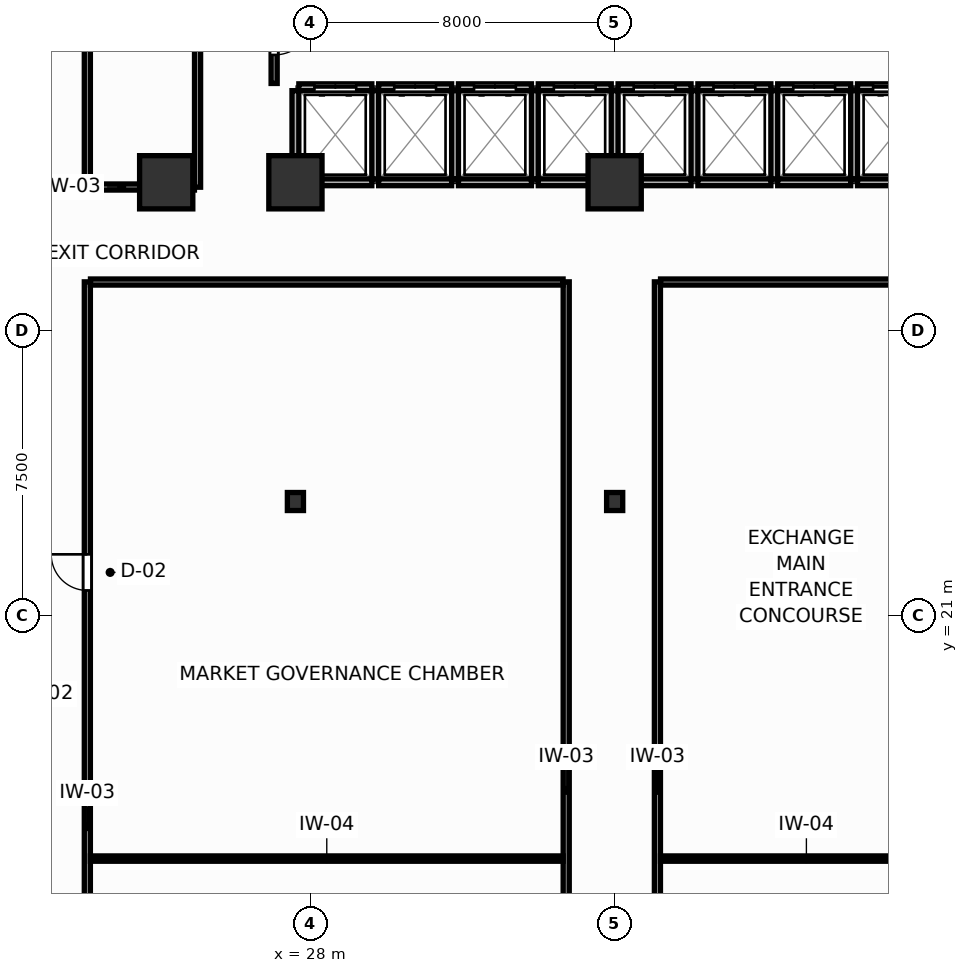
"""IFC4 building model, lengths in metres.
Left out: names, types, materials, properties, quantities, classifications, styles, units other than length and angle.
Written with IfcOpenShell. Run it as: python <this file> out.ifc"""

import sys

from ifc_helpers import new_model, si_unit, direction, frame, frame_2d, origin, origin_2d, place, context, subcontext, project, spatial, rectangle, i_section, extrude, source, transform, mapped, element, fill, save


model = new_model("IFC4")
c1 = context("Model", 3, precision=1e-05, world=origin(), true_north=direction((0.0, 1.0)))
c2 = subcontext(c1, "Body", "Model", "MODEL_VIEW")
j1 = project(units=[si_unit("LENGTHUNIT", "METRE"), si_unit("PLANEANGLEUNIT", "RADIAN")], contexts=[c1])
p1 = place(None, origin())
s1 = spatial("IfcSite", under=j1, at=p1, CompositionType="ELEMENT")
p2 = place(p1, origin())
s2 = spatial("IfcBuilding", under=s1, at=p2, CompositionType="ELEMENT")
p3 = place(p2, origin())
s3 = spatial("IfcBuildingStorey", under=s2, at=p3, CompositionType="ELEMENT", Elevation=0.0)
m1 = source(origin(), c2, "Body", "SweptSolid", [
    extrude(rectangle(XDim=1.4, YDim=1.4, at=origin_2d()), origin(), (0.0, 0.0, 1.0), 4.8),
])
for number, where, z_axis, x_axis in (
    (1, (27.6, 32.4, 0.0), (0.0, 0.0, 1.0), (1.0, 0.0, 0.0)),
    (2, (36.0, 32.4, 0.0), (0.0, 0.0, 1.0), (1.0, 0.0, 0.0)),
    (3, (24.2, 32.4, 0.0), (0.0, 0.0, 1.0), (1.0, 0.0, 0.0)),
):
    element("IfcColumn", number, at=place(p3, frame(where, z_axis=z_axis, x_axis=x_axis)), inside=s3, PredefinedType="COLUMN", context=c2, shape_type="MappedRepresentation", body=[
        mapped(m1, transform((0.0, 0.0, 0.0), scale=1.0)),
    ])
m2 = source(origin(), c2, "Body", "SweptSolid", [
    extrude(i_section(OverallWidth=0.424, OverallDepth=0.474, WebThickness=0.045, FlangeThickness=0.072, FilletRadius=0.015, at=origin_2d()), origin(), (0.0, 0.0, 1.0), 4.8),
])
for number, where, z_axis, x_axis in (
    (4, (27.6, 24.0, 0.0), (0.0, 0.0, 1.0), (1.0, 0.0, 0.0)),
    (5, (36.0, 24.0, 0.0), (0.0, 0.0, 1.0), (1.0, 0.0, 0.0)),
):
    element("IfcColumn", number, at=place(p3, frame(where, z_axis=z_axis, x_axis=x_axis)), inside=s3, PredefinedType="COLUMN", context=c2, shape_type="MappedRepresentation", body=[
        mapped(m2, transform((0.0, 0.0, 0.0), scale=1.0)),
    ])
p4 = place(p3, frame((27.69, 34.9, 0.0), z_axis=(0.0, 0.0, 1.0), x_axis=(1.0, 0.0, 0.0)))
e6 = element("IfcWall", 6, at=p4, inside=s3, PredefinedType="PARTITIONING", context=c2, shape_type="SweptSolid", body=[
    extrude(rectangle(XDim=1.92, YDim=0.18, at=frame_2d((0.96, 0.0))), origin(), (0.0, 0.0, 1.0), 4.52),
])
p5 = place(p4, frame((0.41, 0.0, 0.0)))
e7 = element("IfcOpeningElement", 7, at=p5, cuts=e6, PredefinedType="OPENING", context=c2, shape_type="SweptSolid", body=[
    extrude(rectangle(XDim=1.1, YDim=2.1, at=frame_2d((0.55, 1.05))), frame((0.0, 0.1, 0.0), z_axis=(0.0, -1.0, 0.0), x_axis=(1.0, 0.0, 0.0)), (0.0, 0.0, 1.0), 0.2),
])
p6 = place(p3, frame((27.69, 32.4, 0.0), z_axis=(0.0, 0.0, 1.0), x_axis=(1.0, 0.0, 0.0)))
e8 = element("IfcWall", 8, at=p6, inside=s3, PredefinedType="PARTITIONING", context=c2, shape_type="SweptSolid", body=[
    extrude(rectangle(XDim=1.92, YDim=0.18, at=frame_2d((0.96, 0.0))), origin(), (0.0, 0.0, 1.0), 3.82),
])
p7 = place(p3, frame((27.6, 32.49, 0.0), z_axis=(0.0, 0.0, 1.0), x_axis=(0.0, 1.0, 0.0)))
e9 = element("IfcWall", 9, at=p7, inside=s3, PredefinedType="PARTITIONING", context=c2, shape_type="SweptSolid", body=[
    extrude(rectangle(XDim=2.32, YDim=0.18, at=frame_2d((1.16, 0.0))), origin(), (0.0, 0.0, 1.0), 4.52),
])
p8 = place(p3, frame((29.79, 34.9, 0.0), z_axis=(0.0, 0.0, 1.0), x_axis=(1.0, 0.0, 0.0)))
e10 = element("IfcWall", 10, at=p8, inside=s3, PredefinedType="PARTITIONING", context=c2, shape_type="SweptSolid", body=[
    extrude(rectangle(XDim=1.92, YDim=0.18, at=frame_2d((0.96, 0.0))), origin(), (0.0, 0.0, 1.0), 4.52),
])
p9 = place(p8, frame((0.41, 0.0, 0.0)))
e11 = element("IfcOpeningElement", 11, at=p9, cuts=e10, PredefinedType="OPENING", context=c2, shape_type="SweptSolid", body=[
    extrude(rectangle(XDim=1.1, YDim=2.1, at=frame_2d((0.55, 1.05))), frame((0.0, 0.1, 0.0), z_axis=(0.0, -1.0, 0.0), x_axis=(1.0, 0.0, 0.0)), (0.0, 0.0, 1.0), 0.2),
])
p10 = place(p3, frame((29.79, 32.4, 0.0), z_axis=(0.0, 0.0, 1.0), x_axis=(1.0, 0.0, 0.0)))
e12 = element("IfcWall", 12, at=p10, inside=s3, PredefinedType="PARTITIONING", context=c2, shape_type="SweptSolid", body=[
    extrude(rectangle(XDim=1.92, YDim=0.18, at=frame_2d((0.96, 0.0))), origin(), (0.0, 0.0, 1.0), 3.82),
])
p11 = place(p3, frame((29.7, 32.49, 0.0), z_axis=(0.0, 0.0, 1.0), x_axis=(0.0, 1.0, 0.0)))
e13 = element("IfcWall", 13, at=p11, inside=s3, PredefinedType="PARTITIONING", context=c2, shape_type="SweptSolid", body=[
    extrude(rectangle(XDim=2.32, YDim=0.18, at=frame_2d((1.16, 0.0))), origin(), (0.0, 0.0, 1.0), 4.52),
])
p12 = place(p3, frame((31.89, 34.9, 0.0), z_axis=(0.0, 0.0, 1.0), x_axis=(1.0, 0.0, 0.0)))
e14 = element("IfcWall", 14, at=p12, inside=s3, PredefinedType="PARTITIONING", context=c2, shape_type="SweptSolid", body=[
    extrude(rectangle(XDim=1.92, YDim=0.18, at=frame_2d((0.96, 0.0))), origin(), (0.0, 0.0, 1.0), 4.52),
])
p13 = place(p12, frame((0.41, 0.0, 0.0)))
e15 = element("IfcOpeningElement", 15, at=p13, cuts=e14, PredefinedType="OPENING", context=c2, shape_type="SweptSolid", body=[
    extrude(rectangle(XDim=1.1, YDim=2.1, at=frame_2d((0.55, 1.05))), frame((0.0, 0.1, 0.0), z_axis=(0.0, -1.0, 0.0), x_axis=(1.0, 0.0, 0.0)), (0.0, 0.0, 1.0), 0.2),
])
p14 = place(p3, frame((31.89, 32.4, 0.0), z_axis=(0.0, 0.0, 1.0), x_axis=(1.0, 0.0, 0.0)))
e16 = element("IfcWall", 16, at=p14, inside=s3, PredefinedType="PARTITIONING", context=c2, shape_type="SweptSolid", body=[
    extrude(rectangle(XDim=1.92, YDim=0.18, at=frame_2d((0.96, 0.0))), origin(), (0.0, 0.0, 1.0), 3.82),
])
p15 = place(p3, frame((31.8, 32.49, 0.0), z_axis=(0.0, 0.0, 1.0), x_axis=(0.0, 1.0, 0.0)))
e17 = element("IfcWall", 17, at=p15, inside=s3, PredefinedType="PARTITIONING", context=c2, shape_type="SweptSolid", body=[
    extrude(rectangle(XDim=2.32, YDim=0.18, at=frame_2d((1.16, 0.0))), origin(), (0.0, 0.0, 1.0), 4.52),
])
p16 = place(p3, frame((33.99, 34.9, 0.0), z_axis=(0.0, 0.0, 1.0), x_axis=(1.0, 0.0, 0.0)))
e18 = element("IfcWall", 18, at=p16, inside=s3, PredefinedType="PARTITIONING", context=c2, shape_type="SweptSolid", body=[
    extrude(rectangle(XDim=1.92, YDim=0.18, at=frame_2d((0.96, 0.0))), origin(), (0.0, 0.0, 1.0), 4.52),
])
p17 = place(p16, frame((0.41, 0.0, 0.0)))
e19 = element("IfcOpeningElement", 19, at=p17, cuts=e18, PredefinedType="OPENING", context=c2, shape_type="SweptSolid", body=[
    extrude(rectangle(XDim=1.1, YDim=2.1, at=frame_2d((0.55, 1.05))), frame((0.0, 0.1, 0.0), z_axis=(0.0, -1.0, 0.0), x_axis=(1.0, 0.0, 0.0)), (0.0, 0.0, 1.0), 0.2),
])
p18 = place(p3, frame((33.99, 32.4, 0.0), z_axis=(0.0, 0.0, 1.0), x_axis=(1.0, 0.0, 0.0)))
e20 = element("IfcWall", 20, at=p18, inside=s3, PredefinedType="PARTITIONING", context=c2, shape_type="SweptSolid", body=[
    extrude(rectangle(XDim=1.92, YDim=0.18, at=frame_2d((0.96, 0.0))), origin(), (0.0, 0.0, 1.0), 3.82),
])
p19 = place(p3, frame((33.9, 32.49, 0.0), z_axis=(0.0, 0.0, 1.0), x_axis=(0.0, 1.0, 0.0)))
e21 = element("IfcWall", 21, at=p19, inside=s3, PredefinedType="PARTITIONING", context=c2, shape_type="SweptSolid", body=[
    extrude(rectangle(XDim=2.32, YDim=0.18, at=frame_2d((1.16, 0.0))), origin(), (0.0, 0.0, 1.0), 4.52),
])
p20 = place(p3, frame((36.09, 34.9, 0.0), z_axis=(0.0, 0.0, 1.0), x_axis=(1.0, 0.0, 0.0)))
e22 = element("IfcWall", 22, at=p20, inside=s3, PredefinedType="PARTITIONING", context=c2, shape_type="SweptSolid", body=[
    extrude(rectangle(XDim=1.92, YDim=0.18, at=frame_2d((0.96, 0.0))), origin(), (0.0, 0.0, 1.0), 4.52),
])
p21 = place(p20, frame((0.41, 0.0, 0.0)))
e23 = element("IfcOpeningElement", 23, at=p21, cuts=e22, PredefinedType="OPENING", context=c2, shape_type="SweptSolid", body=[
    extrude(rectangle(XDim=1.1, YDim=2.1, at=frame_2d((0.55, 1.05))), frame((0.0, 0.1, 0.0), z_axis=(0.0, -1.0, 0.0), x_axis=(1.0, 0.0, 0.0)), (0.0, 0.0, 1.0), 0.2),
])
p22 = place(p3, frame((36.09, 32.4, 0.0), z_axis=(0.0, 0.0, 1.0), x_axis=(1.0, 0.0, 0.0)))
e24 = element("IfcWall", 24, at=p22, inside=s3, PredefinedType="PARTITIONING", context=c2, shape_type="SweptSolid", body=[
    extrude(rectangle(XDim=1.92, YDim=0.18, at=frame_2d((0.96, 0.0))), origin(), (0.0, 0.0, 1.0), 3.82),
])
p23 = place(p3, frame((36.0, 32.49, 0.0), z_axis=(0.0, 0.0, 1.0), x_axis=(0.0, 1.0, 0.0)))
e25 = element("IfcWall", 25, at=p23, inside=s3, PredefinedType="PARTITIONING", context=c2, shape_type="SweptSolid", body=[
    extrude(rectangle(XDim=2.32, YDim=0.18, at=frame_2d((1.16, 0.0))), origin(), (0.0, 0.0, 1.0), 4.52),
])
p24 = place(p3, frame((38.19, 34.9, 0.0), z_axis=(0.0, 0.0, 1.0), x_axis=(1.0, 0.0, 0.0)))
e26 = element("IfcWall", 26, at=p24, inside=s3, PredefinedType="PARTITIONING", context=c2, shape_type="SweptSolid", body=[
    extrude(rectangle(XDim=1.92, YDim=0.18, at=frame_2d((0.96, 0.0))), origin(), (0.0, 0.0, 1.0), 4.52),
])
p25 = place(p24, frame((0.41, 0.0, 0.0)))
e27 = element("IfcOpeningElement", 27, at=p25, cuts=e26, PredefinedType="OPENING", context=c2, shape_type="SweptSolid", body=[
    extrude(rectangle(XDim=1.1, YDim=2.1, at=frame_2d((0.55, 1.05))), frame((0.0, 0.1, 0.0), z_axis=(0.0, -1.0, 0.0), x_axis=(1.0, 0.0, 0.0)), (0.0, 0.0, 1.0), 0.2),
])
p26 = place(p3, frame((38.19, 32.4, 0.0), z_axis=(0.0, 0.0, 1.0), x_axis=(1.0, 0.0, 0.0)))
e28 = element("IfcWall", 28, at=p26, inside=s3, PredefinedType="PARTITIONING", context=c2, shape_type="SweptSolid", body=[
    extrude(rectangle(XDim=1.92, YDim=0.18, at=frame_2d((0.96, 0.0))), origin(), (0.0, 0.0, 1.0), 3.82),
])
p27 = place(p3, frame((38.1, 32.49, 0.0), z_axis=(0.0, 0.0, 1.0), x_axis=(0.0, 1.0, 0.0)))
e29 = element("IfcWall", 29, at=p27, inside=s3, PredefinedType="PARTITIONING", context=c2, shape_type="SweptSolid", body=[
    extrude(rectangle(XDim=2.32, YDim=0.18, at=frame_2d((1.16, 0.0))), origin(), (0.0, 0.0, 1.0), 4.52),
])
p28 = place(p3, frame((40.29, 34.9, 0.0), z_axis=(0.0, 0.0, 1.0), x_axis=(1.0, 0.0, 0.0)))
e30 = element("IfcWall", 30, at=p28, inside=s3, PredefinedType="PARTITIONING", context=c2, shape_type="SweptSolid", body=[
    extrude(rectangle(XDim=1.92, YDim=0.18, at=frame_2d((0.96, 0.0))), origin(), (0.0, 0.0, 1.0), 4.52),
])
p29 = place(p28, frame((0.41, 0.0, 0.0)))
e31 = element("IfcOpeningElement", 31, at=p29, cuts=e30, PredefinedType="OPENING", context=c2, shape_type="SweptSolid", body=[
    extrude(rectangle(XDim=1.1, YDim=2.1, at=frame_2d((0.55, 1.05))), frame((0.0, 0.1, 0.0), z_axis=(0.0, -1.0, 0.0), x_axis=(1.0, 0.0, 0.0)), (0.0, 0.0, 1.0), 0.2),
])
p30 = place(p3, frame((40.29, 32.4, 0.0), z_axis=(0.0, 0.0, 1.0), x_axis=(1.0, 0.0, 0.0)))
e32 = element("IfcWall", 32, at=p30, inside=s3, PredefinedType="PARTITIONING", context=c2, shape_type="SweptSolid", body=[
    extrude(rectangle(XDim=1.92, YDim=0.18, at=frame_2d((0.96, 0.0))), origin(), (0.0, 0.0, 1.0), 3.82),
])
p31 = place(p3, frame((40.2, 32.49, 0.0), z_axis=(0.0, 0.0, 1.0), x_axis=(0.0, 1.0, 0.0)))
e33 = element("IfcWall", 33, at=p31, inside=s3, PredefinedType="PARTITIONING", context=c2, shape_type="SweptSolid", body=[
    extrude(rectangle(XDim=2.32, YDim=0.18, at=frame_2d((1.16, 0.0))), origin(), (0.0, 0.0, 1.0), 4.52),
])
p32 = place(p3, frame((42.39, 34.9, 0.0), z_axis=(0.0, 0.0, 1.0), x_axis=(1.0, 0.0, 0.0)))
e34 = element("IfcWall", 34, at=p32, inside=s3, PredefinedType="PARTITIONING", context=c2, shape_type="SweptSolid", body=[
    extrude(rectangle(XDim=1.92, YDim=0.18, at=frame_2d((0.96, 0.0))), origin(), (0.0, 0.0, 1.0), 4.52),
])
p33 = place(p32, frame((0.41, 0.0, 0.0)))
e35 = element("IfcOpeningElement", 35, at=p33, cuts=e34, PredefinedType="OPENING", context=c2, shape_type="SweptSolid", body=[
    extrude(rectangle(XDim=1.1, YDim=2.1, at=frame_2d((0.55, 1.05))), frame((0.0, 0.1, 0.0), z_axis=(0.0, -1.0, 0.0), x_axis=(1.0, 0.0, 0.0)), (0.0, 0.0, 1.0), 0.2),
])
p34 = place(p3, frame((42.39, 32.4, 0.0), z_axis=(0.0, 0.0, 1.0), x_axis=(1.0, 0.0, 0.0)))
e36 = element("IfcWall", 36, at=p34, inside=s3, PredefinedType="PARTITIONING", context=c2, shape_type="SweptSolid", body=[
    extrude(rectangle(XDim=1.92, YDim=0.18, at=frame_2d((0.96, 0.0))), origin(), (0.0, 0.0, 1.0), 3.82),
])
p35 = place(p3, frame((42.3, 32.49, 0.0), z_axis=(0.0, 0.0, 1.0), x_axis=(0.0, 1.0, 0.0)))
e37 = element("IfcWall", 37, at=p35, inside=s3, PredefinedType="PARTITIONING", context=c2, shape_type="SweptSolid", body=[
    extrude(rectangle(XDim=2.32, YDim=0.18, at=frame_2d((1.16, 0.0))), origin(), (0.0, 0.0, 1.0), 4.52),
])
p36 = place(p3, frame((27.04, 35.0, 0.0), z_axis=(0.0, 0.0, 1.0), x_axis=(0.0, 1.0, 0.0)))
e38 = element("IfcWall", 38, at=p36, inside=s3, PredefinedType="PARTITIONING", context=c2, shape_type="SweptSolid", body=[
    extrude(rectangle(XDim=2.65, YDim=0.16, at=frame_2d((1.325, 0.0))), origin(), (0.0, 0.0, 1.0), 4.52),
])
p37 = place(p36, frame((0.75, 0.0, 0.0)))
e39 = element("IfcOpeningElement", 39, at=p37, cuts=e38, PredefinedType="OPENING", context=c2, shape_type="SweptSolid", body=[
    extrude(rectangle(XDim=1.05, YDim=2.1, at=frame_2d((0.525, 1.05))), frame((0.0, 0.09, 0.0), z_axis=(0.0, -1.0, 0.0), x_axis=(1.0, 0.0, 0.0)), (0.0, 0.0, 1.0), 0.18),
])
p38 = place(p3, frame((37.125, 3.02, 0.0), z_axis=(0.0, 0.0, 1.0), x_axis=(0.0, 1.0, 0.0)))
e40 = element("IfcWall", 40, at=p38, inside=s3, PredefinedType="PARTITIONING", context=c2, shape_type="SweptSolid", body=[
    extrude(rectangle(XDim=26.76, YDim=0.16, at=frame_2d((13.38, 0.0))), origin(), (0.0, 0.0, 1.0), 4.52),
])
p39 = place(p3, frame((22.125, 3.02, 0.0), z_axis=(0.0, 0.0, 1.0), x_axis=(0.0, 1.0, 0.0)))
e41 = element("IfcWall", 41, at=p39, inside=s3, PredefinedType="PARTITIONING", context=c2, shape_type="SweptSolid", body=[
    extrude(rectangle(XDim=26.76, YDim=0.16, at=frame_2d((13.38, 0.0))), origin(), (0.0, 0.0, 1.0), 4.52),
])
p40 = place(p39, frame((5.263, 0.0, 0.0)))
e42 = element("IfcOpeningElement", 42, at=p40, cuts=e41, PredefinedType="OPENING", context=c2, shape_type="SweptSolid", body=[
    extrude(rectangle(XDim=0.95, YDim=2.05, at=frame_2d((0.475, 1.025))), frame((0.0, 0.09, 0.0), z_axis=(0.0, -1.0, 0.0), x_axis=(1.0, 0.0, 0.0)), (0.0, 0.0, 1.0), 0.18),
])
p41 = place(p39, frame((18.64, 0.0, 0.0)))
e43 = element("IfcOpeningElement", 43, at=p41, cuts=e41, PredefinedType="OPENING", context=c2, shape_type="SweptSolid", body=[
    extrude(rectangle(XDim=0.95, YDim=2.05, at=frame_2d((0.475, 1.025))), frame((0.0, 0.09, 0.0), z_axis=(0.0, -1.0, 0.0), x_axis=(1.0, 0.0, 0.0)), (0.0, 0.0, 1.0), 0.18),
])
p42 = place(p3, frame((34.725, 3.02, 0.0), z_axis=(0.0, 0.0, 1.0), x_axis=(0.0, 1.0, 0.0)))
e44 = element("IfcWall", 44, at=p42, inside=s3, PredefinedType="PARTITIONING", context=c2, shape_type="SweptSolid", body=[
    extrude(rectangle(XDim=26.76, YDim=0.16, at=frame_2d((13.38, 0.0))), origin(), (0.0, 0.0, 1.0), 4.52),
])
p43 = place(p3, frame((22.125, 32.27, 0.0), z_axis=(0.0, 0.0, 1.0), x_axis=(0.0, 1.0, 0.0)))
e45 = element("IfcWall", 45, at=p43, inside=s3, PredefinedType="PARTITIONING", context=c2, shape_type="SweptSolid", body=[
    extrude(rectangle(XDim=26.71, YDim=0.16, at=frame_2d((13.355, 0.0))), origin(), (0.0, 0.0, 1.0), 4.52),
])
p44 = place(p43, frame((7.145, 0.0, 0.0)))
e46 = element("IfcOpeningElement", 46, at=p44, cuts=e45, PredefinedType="OPENING", context=c2, shape_type="SweptSolid", body=[
    extrude(rectangle(XDim=0.95, YDim=2.05, at=frame_2d((0.475, 1.025))), frame((0.0, 0.09, 0.0), z_axis=(0.0, -1.0, 0.0), x_axis=(1.0, 0.0, 0.0)), (0.0, 0.0, 1.0), 0.18),
])
p45 = place(p43, frame((20.283, 0.0, 0.0)))
e47 = element("IfcOpeningElement", 47, at=p45, cuts=e45, PredefinedType="OPENING", context=c2, shape_type="SweptSolid", body=[
    extrude(rectangle(XDim=0.95, YDim=2.05, at=frame_2d((0.475, 1.025))), frame((0.0, 0.09, 0.0), z_axis=(0.0, -1.0, 0.0), x_axis=(1.0, 0.0, 0.0)), (0.0, 0.0, 1.0), 0.18),
])
p46 = place(p3, frame((25.025, 32.27, 0.0), z_axis=(0.0, 0.0, 1.0), x_axis=(0.0, 1.0, 0.0)))
e48 = element("IfcWall", 48, at=p46, inside=s3, PredefinedType="PARTITIONING", context=c2, shape_type="SweptSolid", body=[
    extrude(rectangle(XDim=26.71, YDim=0.16, at=frame_2d((13.355, 0.0))), origin(), (0.0, 0.0, 1.0), 4.52),
])
p47 = place(p3, frame((22.207, 29.775, 0.0), z_axis=(0.0, 0.0, 1.0), x_axis=(1.0, 0.0, 0.0)))
e49 = element("IfcWall", 49, at=p47, inside=s3, PredefinedType="PARTITIONING", context=c2, shape_type="SweptSolid", body=[
    extrude(rectangle(XDim=12.436, YDim=0.16, at=frame_2d((6.218, 0.0))), origin(), (0.0, 0.0, 1.0), 4.52),
])
p48 = place(p3, frame((37.207, 29.775, 0.0), z_axis=(0.0, 0.0, 1.0), x_axis=(1.0, 0.0, 0.0)))
e50 = element("IfcWall", 50, at=p48, inside=s3, PredefinedType="PARTITIONING", context=c2, shape_type="SweptSolid", body=[
    extrude(rectangle(XDim=7.676, YDim=0.16, at=frame_2d((3.838, 0.0))), origin(), (0.0, 0.0, 1.0), 4.52),
])
p49 = place(p3, frame((22.207, 32.275, 0.0), z_axis=(0.0, 0.0, 1.0), x_axis=(1.0, 0.0, 0.0)))
e51 = element("IfcWall", 51, at=p49, inside=s3, PredefinedType="PARTITIONING", context=c2, shape_type="SweptSolid", body=[
    extrude(rectangle(XDim=2.736, YDim=0.16, at=frame_2d((1.368, 0.0))), origin(), (0.0, 0.0, 1.0), 3.82),
])
p50 = place(p3, frame((22.207, 14.605, 0.0), z_axis=(0.0, 0.0, 1.0), x_axis=(1.0, 0.0, 0.0)))
e52 = element("IfcWall", 52, at=p50, inside=s3, PredefinedType="PARTITIONING", context=c2, shape_type="SweptSolid", body=[
    extrude(rectangle(XDim=12.436, YDim=0.14, at=frame_2d((6.218, 0.0))), origin(), (0.0, 0.0, 1.0), 4.52),
])
p51 = place(p3, frame((37.207, 14.605, 0.0), z_axis=(0.0, 0.0, 1.0), x_axis=(1.0, 0.0, 0.0)))
e53 = element("IfcWall", 53, at=p51, inside=s3, PredefinedType="PARTITIONING", context=c2, shape_type="SweptSolid", body=[
    extrude(rectangle(XDim=7.676, YDim=0.14, at=frame_2d((3.838, 0.0))), origin(), (0.0, 0.0, 1.0), 4.52),
])
p52 = place(p5, origin())
e54 = element("IfcDoor", 54, at=p52, inside=s3, OperationType="DOUBLE_DOOR_SLIDING", PredefinedType="DOOR", context=c2, shape_type="SweptSolid", body=[
    extrude(rectangle(XDim=1.1, YDim=2.1, at=frame_2d((0.55, 1.05))), frame((0.0, 0.025, 0.0), z_axis=(0.0, -1.0, 0.0), x_axis=(1.0, 0.0, 0.0)), (0.0, 0.0, 1.0), 0.05),
])
fill(e7, e54)
p53 = place(p9, origin())
e55 = element("IfcDoor", 55, at=p53, inside=s3, OperationType="DOUBLE_DOOR_SLIDING", PredefinedType="DOOR", context=c2, shape_type="SweptSolid", body=[
    extrude(rectangle(XDim=1.1, YDim=2.1, at=frame_2d((0.55, 1.05))), frame((0.0, 0.025, 0.0), z_axis=(0.0, -1.0, 0.0), x_axis=(1.0, 0.0, 0.0)), (0.0, 0.0, 1.0), 0.05),
])
fill(e11, e55)
p54 = place(p13, origin())
e56 = element("IfcDoor", 56, at=p54, inside=s3, OperationType="DOUBLE_DOOR_SLIDING", PredefinedType="DOOR", context=c2, shape_type="SweptSolid", body=[
    extrude(rectangle(XDim=1.1, YDim=2.1, at=frame_2d((0.55, 1.05))), frame((0.0, 0.025, 0.0), z_axis=(0.0, -1.0, 0.0), x_axis=(1.0, 0.0, 0.0)), (0.0, 0.0, 1.0), 0.05),
])
fill(e15, e56)
p55 = place(p17, origin())
e57 = element("IfcDoor", 57, at=p55, inside=s3, OperationType="DOUBLE_DOOR_SLIDING", PredefinedType="DOOR", context=c2, shape_type="SweptSolid", body=[
    extrude(rectangle(XDim=1.1, YDim=2.1, at=frame_2d((0.55, 1.05))), frame((0.0, 0.025, 0.0), z_axis=(0.0, -1.0, 0.0), x_axis=(1.0, 0.0, 0.0)), (0.0, 0.0, 1.0), 0.05),
])
fill(e19, e57)
p56 = place(p21, origin())
e58 = element("IfcDoor", 58, at=p56, inside=s3, OperationType="DOUBLE_DOOR_SLIDING", PredefinedType="DOOR", context=c2, shape_type="SweptSolid", body=[
    extrude(rectangle(XDim=1.1, YDim=2.1, at=frame_2d((0.55, 1.05))), frame((0.0, 0.025, 0.0), z_axis=(0.0, -1.0, 0.0), x_axis=(1.0, 0.0, 0.0)), (0.0, 0.0, 1.0), 0.05),
])
fill(e23, e58)
p57 = place(p25, origin())
e59 = element("IfcDoor", 59, at=p57, inside=s3, OperationType="DOUBLE_DOOR_SLIDING", PredefinedType="DOOR", context=c2, shape_type="SweptSolid", body=[
    extrude(rectangle(XDim=1.1, YDim=2.1, at=frame_2d((0.55, 1.05))), frame((0.0, 0.025, 0.0), z_axis=(0.0, -1.0, 0.0), x_axis=(1.0, 0.0, 0.0)), (0.0, 0.0, 1.0), 0.05),
])
fill(e27, e59)
p58 = place(p29, origin())
e60 = element("IfcDoor", 60, at=p58, inside=s3, OperationType="DOUBLE_DOOR_SLIDING", PredefinedType="DOOR", context=c2, shape_type="SweptSolid", body=[
    extrude(rectangle(XDim=1.1, YDim=2.1, at=frame_2d((0.55, 1.05))), frame((0.0, 0.025, 0.0), z_axis=(0.0, -1.0, 0.0), x_axis=(1.0, 0.0, 0.0)), (0.0, 0.0, 1.0), 0.05),
])
fill(e31, e60)
p59 = place(p33, origin())
e61 = element("IfcDoor", 61, at=p59, inside=s3, OperationType="DOUBLE_DOOR_SLIDING", PredefinedType="DOOR", context=c2, shape_type="SweptSolid", body=[
    extrude(rectangle(XDim=1.1, YDim=2.1, at=frame_2d((0.55, 1.05))), frame((0.0, 0.025, 0.0), z_axis=(0.0, -1.0, 0.0), x_axis=(1.0, 0.0, 0.0)), (0.0, 0.0, 1.0), 0.05),
])
fill(e35, e61)
p60 = place(p37, frame((1.05, 0.0, 0.0), z_axis=(0.0, 0.0, 1.0), x_axis=(-1.0, 0.0, 0.0)))
e62 = element("IfcDoor", 62, at=p60, inside=s3, OperationType="SINGLE_SWING_LEFT", PredefinedType="DOOR", context=c2, shape_type="SweptSolid", body=[
    extrude(rectangle(XDim=1.05, YDim=2.1, at=frame_2d((0.525, 1.05))), frame((0.0, 0.025, 0.0), z_axis=(0.0, -1.0, 0.0), x_axis=(1.0, 0.0, 0.0)), (0.0, 0.0, 1.0), 0.05),
])
fill(e39, e62)
p61 = place(p41, origin())
e63 = element("IfcDoor", 63, at=p61, inside=s3, OperationType="SINGLE_SWING_RIGHT", PredefinedType="DOOR", context=c2, shape_type="SweptSolid", body=[
    extrude(rectangle(XDim=0.95, YDim=2.05, at=frame_2d((0.475, 1.025))), frame((0.0, 0.025, 0.0), z_axis=(0.0, -1.0, 0.0), x_axis=(1.0, 0.0, 0.0)), (0.0, 0.0, 1.0), 0.05),
])
fill(e43, e63)
save(model, sys.argv[1])
